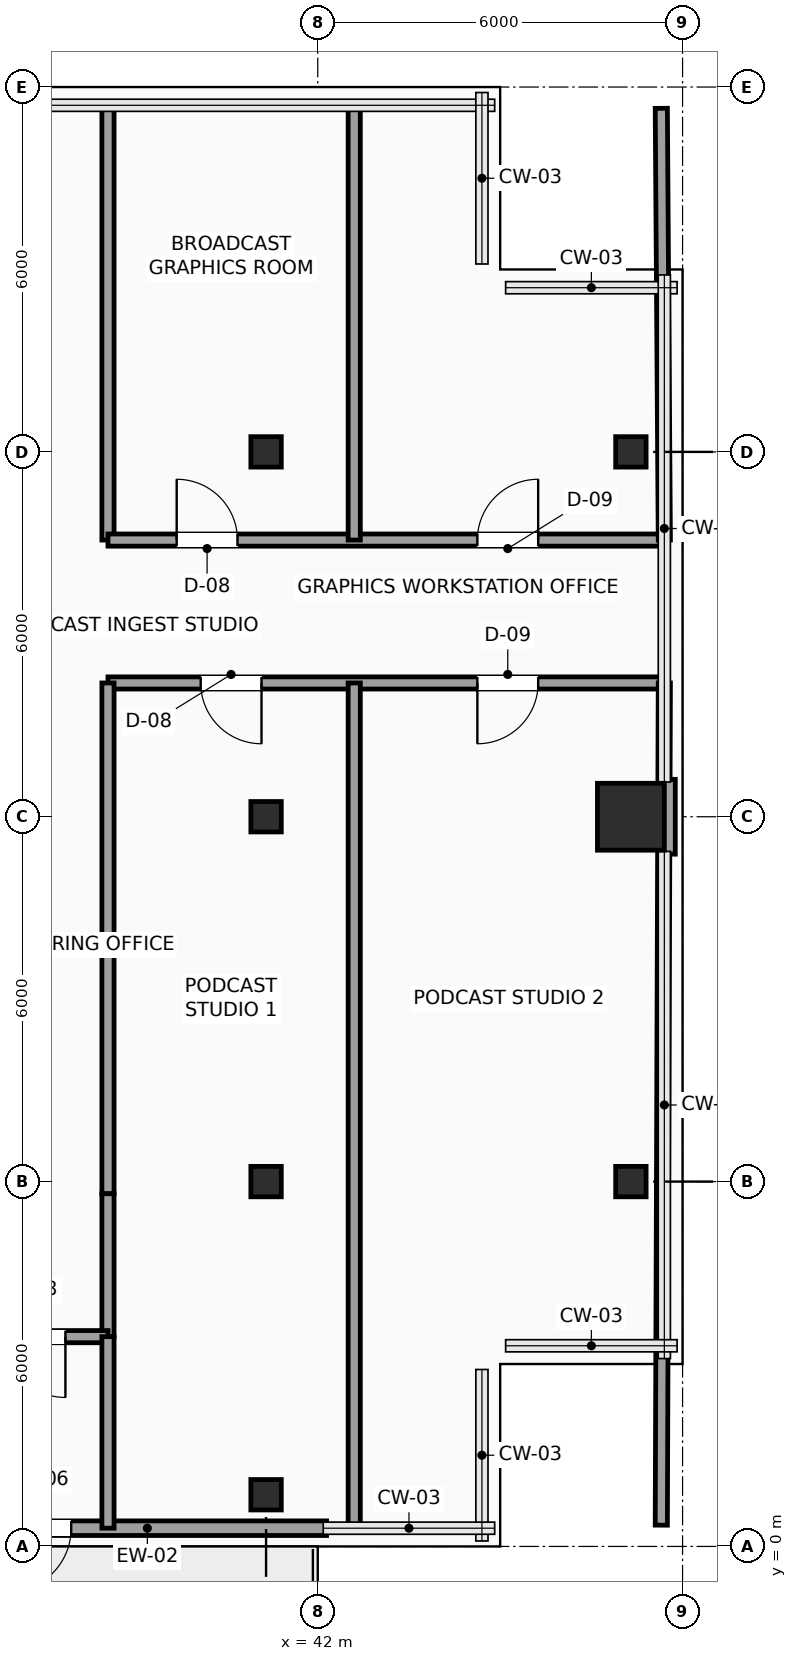
"""IFC4 building model, lengths in metres.
Left out: names, types, materials, properties, quantities, classifications, styles, units other than length and angle.
Written with IfcOpenShell. Run it as: python <this file> out.ifc"""

import sys

from ifc_helpers import new_model, si_unit, direction, frame, frame_2d, origin, origin_2d, place, context, subcontext, project, spatial, rectangle, hollow_rectangle, extrude, element, fill, save


model = new_model("IFC4")
c1 = context("Model", 3, precision=1e-05, world=origin(), true_north=direction((0.0, 1.0)))
c2 = subcontext(c1, "Body", "Model", "MODEL_VIEW")
j1 = project(units=[si_unit("LENGTHUNIT", "METRE"), si_unit("PLANEANGLEUNIT", "RADIAN")], contexts=[c1])
p1 = place(None, origin())
s1 = spatial("IfcSite", under=j1, at=p1, CompositionType="ELEMENT")
p2 = place(p1, origin())
s2 = spatial("IfcBuilding", under=s1, at=p2, CompositionType="ELEMENT")
p3 = place(p2, frame((0.0, 0.0, 119.4)))
s3 = spatial("IfcBuildingStorey", under=s2, at=p3, CompositionType="ELEMENT", Elevation=119.4)
for number, where, z_axis, x_axis in (
    (1, (41.15, 0.85, 0.0), (0.0, 0.0, 1.0), (1.0, 0.0, 0.0)),
    (2, (41.15, 6.0, 0.0), (0.0, 0.0, 1.0), (1.0, 0.0, 0.0)),
    (3, (41.15, 12.0, 0.0), (0.0, 0.0, 1.0), (1.0, 0.0, 0.0)),
    (4, (41.15, 18.0, 0.0), (0.0, 0.0, 1.0), (1.0, 0.0, 0.0)),
    (5, (47.15, 6.0, 0.0), (0.0, 0.0, 1.0), (1.0, 0.0, 0.0)),
):
    element("IfcColumn", number, at=place(p3, frame(where, z_axis=z_axis, x_axis=x_axis)), inside=s3, PredefinedType="COLUMN", context=c2, shape_type="SweptSolid", body=[
        extrude(hollow_rectangle(XDim=0.5, YDim=0.5, WallThickness=0.025, InnerFilletRadius=0.025, OuterFilletRadius=0.04, at=origin_2d()), origin(), (0.0, 0.0, 1.0), 3.75),
    ])
p4 = place(p3, frame((47.15, 12.0, 0.0), z_axis=(0.0, 0.0, 1.0), x_axis=(1.0, 0.0, 0.0)))
e6 = element("IfcColumn", 6, at=p4, inside=s3, PredefinedType="COLUMN", context=c2, shape_type="SweptSolid", body=[
    extrude(rectangle(XDim=1.1, YDim=1.1, at=origin_2d()), origin(), (0.0, 0.0, 1.0), 3.75),
])
p5 = place(p3, frame((47.15, 18.0, 0.0), z_axis=(0.0, 0.0, 1.0), x_axis=(1.0, 0.0, 0.0)))
e7 = element("IfcColumn", 7, at=p5, inside=s3, PredefinedType="COLUMN", context=c2, shape_type="SweptSolid", body=[
    extrude(hollow_rectangle(XDim=0.5, YDim=0.5, WallThickness=0.025, InnerFilletRadius=0.025, OuterFilletRadius=0.04, at=origin_2d()), origin(), (0.0, 0.0, 1.0), 3.75),
])
p6 = place(p3, frame((42.145, 0.3, 0.0), z_axis=(0.0, 0.0, 1.0), x_axis=(-1.0, 0.0, 0.0)))
e8 = element("IfcWall", 8, at=p6, inside=s3, PredefinedType="SOLIDWALL", context=c2, shape_type="SweptSolid", body=[
    extrude(rectangle(XDim=9.29, YDim=0.24, at=frame_2d((4.645, 0.0))), origin(), (0.0, 0.0, 1.0), 3.525),
])
p7 = place(p6, frame((4.2, 0.0, 0.0)))
e9 = element("IfcOpeningElement", 9, at=p7, cuts=e8, PredefinedType="OPENING", context=c2, shape_type="SweptSolid", body=[
    extrude(rectangle(XDim=1.05, YDim=2.2, at=frame_2d((0.525, 1.1))), frame((0.0, 0.13, 0.0), z_axis=(0.0, -1.0, 0.0), x_axis=(1.0, 0.0, 0.0)), (0.0, 0.0, 1.0), 0.26),
])
p8 = place(p3, frame((47.76, 12.615, 0.0), z_axis=(0.0, 0.0, 1.0), x_axis=(0.0, -1.0, 0.0)))
e10 = element("IfcWall", 10, at=p8, inside=s3, PredefinedType="SOLIDWALL", context=c2, shape_type="SweptSolid", body=[
    extrude(rectangle(XDim=1.23, YDim=0.24, at=frame_2d((0.615, 0.0))), origin(), (0.0, 0.0, 1.0), 3.525),
])
p9 = place(p3, frame((38.55, 23.7, 0.0), z_axis=(0.0, 0.0, 1.0), x_axis=(0.0, -1.0, 0.0)))
e11 = element("IfcWall", 11, at=p9, inside=s3, PredefinedType="SOLIDWALL", context=c2, shape_type="SweptSolid", body=[
    extrude(rectangle(XDim=7.15, YDim=0.2, at=frame_2d((3.575, 0.0))), origin(), (0.0, 0.0, 1.0), 3.525),
])
p10 = place(p3, frame((38.55, 16.55, 0.0), z_axis=(0.0, 0.0, 1.0), x_axis=(1.0, 0.0, 0.0)))
e12 = element("IfcWall", 12, at=p10, inside=s3, PredefinedType="SOLIDWALL", context=c2, shape_type="SweptSolid", body=[
    extrude(rectangle(XDim=9.15, YDim=0.2, at=frame_2d((4.575, 0.0))), origin(), (0.0, 0.0, 1.0), 3.525),
])
p11 = place(p10, frame((1.13, 0.0, 0.0)))
e13 = element("IfcOpeningElement", 13, at=p11, cuts=e12, PredefinedType="OPENING", context=c2, shape_type="SweptSolid", body=[
    extrude(rectangle(XDim=1.0, YDim=2.2, at=frame_2d((0.5, 1.1))), frame((0.0, 0.11, 0.0), z_axis=(0.0, -1.0, 0.0), x_axis=(1.0, 0.0, 0.0)), (0.0, 0.0, 1.0), 0.22),
])
p12 = place(p10, frame((6.075, 0.0, 0.0)))
e14 = element("IfcOpeningElement", 14, at=p12, cuts=e12, PredefinedType="OPENING", context=c2, shape_type="SweptSolid", body=[
    extrude(rectangle(XDim=1.0, YDim=2.2, at=frame_2d((0.5, 1.1))), frame((0.0, 0.11, 0.0), z_axis=(0.0, -1.0, 0.0), x_axis=(1.0, 0.0, 0.0)), (0.0, 0.0, 1.0), 0.22),
])
p13 = place(p3, frame((47.7, 14.2, 0.0), z_axis=(0.0, 0.0, 1.0), x_axis=(-1.0, 0.0, 0.0)))
e15 = element("IfcWall", 15, at=p13, inside=s3, PredefinedType="SOLIDWALL", context=c2, shape_type="SweptSolid", body=[
    extrude(rectangle(XDim=9.15, YDim=0.2, at=frame_2d((4.575, 0.0))), origin(), (0.0, 0.0, 1.0), 3.525),
])
p14 = place(p13, frame((6.625, 0.0, 0.0)))
e16 = element("IfcOpeningElement", 16, at=p14, cuts=e15, PredefinedType="OPENING", context=c2, shape_type="SweptSolid", body=[
    extrude(rectangle(XDim=1.0, YDim=2.2, at=frame_2d((0.5, 1.1))), frame((0.0, 0.11, 0.0), z_axis=(0.0, -1.0, 0.0), x_axis=(1.0, 0.0, 0.0)), (0.0, 0.0, 1.0), 0.22),
])
p15 = place(p13, frame((2.075, 0.0, 0.0)))
e17 = element("IfcOpeningElement", 17, at=p15, cuts=e15, PredefinedType="OPENING", context=c2, shape_type="SweptSolid", body=[
    extrude(rectangle(XDim=1.0, YDim=2.2, at=frame_2d((0.5, 1.1))), frame((0.0, 0.11, 0.0), z_axis=(0.0, -1.0, 0.0), x_axis=(1.0, 0.0, 0.0)), (0.0, 0.0, 1.0), 0.22),
])
p16 = place(p3, frame((38.55, 14.2, 0.0), z_axis=(0.0, 0.0, 1.0), x_axis=(0.0, -1.0, 0.0)))
e18 = element("IfcWall", 18, at=p16, inside=s3, PredefinedType="SOLIDWALL", context=c2, shape_type="SweptSolid", body=[
    extrude(rectangle(XDim=8.4, YDim=0.2, at=frame_2d((4.2, 0.0))), origin(), (0.0, 0.0, 1.0), 3.525),
])
p17 = place(p3, frame((38.55, 5.8, 0.0), z_axis=(0.0, 0.0, 1.0), x_axis=(0.0, -1.0, 0.0)))
e19 = element("IfcWall", 19, at=p17, inside=s3, PredefinedType="SOLIDWALL", context=c2, shape_type="SweptSolid", body=[
    extrude(rectangle(XDim=2.35, YDim=0.2, at=frame_2d((1.175, 0.0))), origin(), (0.0, 0.0, 1.0), 3.525),
])
p18 = place(p3, frame((38.55, 3.45, 0.0), z_axis=(0.0, 0.0, 1.0), x_axis=(-1.0, 0.0, 0.0)))
e20 = element("IfcWall", 20, at=p18, inside=s3, PredefinedType="SOLIDWALL", context=c2, shape_type="SweptSolid", body=[
    extrude(rectangle(XDim=2.4, YDim=0.2, at=frame_2d((1.2, 0.0))), origin(), (0.0, 0.0, 1.0), 3.067),
])
p19 = place(p18, frame((0.7, 0.0, 0.0)))
e21 = element("IfcOpeningElement", 21, at=p19, cuts=e20, PredefinedType="OPENING", context=c2, shape_type="SweptSolid", body=[
    extrude(rectangle(XDim=1.0, YDim=2.2, at=frame_2d((0.5, 1.1))), frame((0.0, 0.11, 0.0), z_axis=(0.0, -1.0, 0.0), x_axis=(1.0, 0.0, 0.0)), (0.0, 0.0, 1.0), 0.22),
])
p20 = place(p3, frame((38.55, 0.3, 0.0), z_axis=(0.0, 0.0, 1.0), x_axis=(0.0, 1.0, 0.0)))
e22 = element("IfcWall", 22, at=p20, inside=s3, PredefinedType="PARTITIONING", context=c2, shape_type="SweptSolid", body=[
    extrude(rectangle(XDim=3.15, YDim=0.2, at=frame_2d((1.575, 0.0))), origin(), (0.0, 0.0, 1.0), 3.525),
])
p21 = place(p3, frame((42.6, 0.3, 0.0), z_axis=(0.0, 0.0, 1.0), x_axis=(0.0, 1.0, 0.0)))
e23 = element("IfcWall", 23, at=p21, inside=s3, PredefinedType="PARTITIONING", context=c2, shape_type="SweptSolid", body=[
    extrude(rectangle(XDim=13.9, YDim=0.2, at=frame_2d((6.95, 0.0))), origin(), (0.0, 0.0, 1.0), 3.525),
])
p22 = place(p3, frame((47.65, 0.35, 0.0), z_axis=(0.0, 0.0, 1.0), x_axis=(0.003606251025, 0.999993497456, 0.0)))
e24 = element("IfcWall", 24, at=p22, inside=s3, PredefinedType="PARTITIONING", context=c2, shape_type="SweptSolid", body=[
    extrude(rectangle(XDim=11.035, YDim=0.2, at=frame_2d((5.518, 0.0))), origin(), (0.0, 0.0, 1.0), 3.525),
])
p23 = place(p3, frame((47.694, 12.615, 0.0), z_axis=(0.0, 0.0, 1.0), x_axis=(0.003542799701, 0.999993724265, 0.0)))
e25 = element("IfcWall", 25, at=p23, inside=s3, PredefinedType="PARTITIONING", context=c2, shape_type="SweptSolid", body=[
    extrude(rectangle(XDim=1.585, YDim=0.2, at=frame_2d((0.792, 0.0))), origin(), (0.0, 0.0, 1.0), 3.525),
])
p24 = place(p3, frame((42.6, 16.55, 0.0), z_axis=(0.0, 0.0, 1.0), x_axis=(0.0, 1.0, 0.0)))
e26 = element("IfcWall", 26, at=p24, inside=s3, PredefinedType="PARTITIONING", context=c2, shape_type="SweptSolid", body=[
    extrude(rectangle(XDim=7.15, YDim=0.2, at=frame_2d((3.575, 0.0))), origin(), (0.0, 0.0, 1.0), 3.525),
])
p25 = place(p3, frame((47.7, 16.55, 0.0), z_axis=(0.0, 0.0, 1.0), x_axis=(-0.007049101019, 0.999975154779, 0.0)))
e27 = element("IfcWall", 27, at=p25, inside=s3, PredefinedType="PARTITIONING", context=c2, shape_type="SweptSolid", body=[
    extrude(rectangle(XDim=7.1, YDim=0.2, at=frame_2d((3.55, 0.0))), origin(), (0.0, 0.0, 1.0), 3.525),
])
p26 = place(p7, origin())
e28 = element("IfcDoor", 28, at=p26, inside=s3, OperationType="SINGLE_SWING_RIGHT", PredefinedType="DOOR", context=c2, shape_type="SweptSolid", body=[
    extrude(rectangle(XDim=1.05, YDim=2.2, at=frame_2d((0.525, 1.1))), frame((0.0, 0.025, 0.0), z_axis=(0.0, -1.0, 0.0), x_axis=(1.0, 0.0, 0.0)), (0.0, 0.0, 1.0), 0.05),
])
fill(e9, e28)
p27 = place(p11, origin())
e29 = element("IfcDoor", 29, at=p27, inside=s3, OperationType="SINGLE_SWING_LEFT", PredefinedType="DOOR", context=c2, shape_type="SweptSolid", body=[
    extrude(rectangle(XDim=1.0, YDim=2.2, at=frame_2d((0.5, 1.1))), frame((0.0, 0.025, 0.0), z_axis=(0.0, -1.0, 0.0), x_axis=(1.0, 0.0, 0.0)), (0.0, 0.0, 1.0), 0.05),
])
fill(e13, e29)
p28 = place(p12, origin())
e30 = element("IfcDoor", 30, at=p28, inside=s3, OperationType="SINGLE_SWING_RIGHT", PredefinedType="DOOR", context=c2, shape_type="SweptSolid", body=[
    extrude(rectangle(XDim=1.0, YDim=2.2, at=frame_2d((0.5, 1.1))), frame((0.0, 0.025, 0.0), z_axis=(0.0, -1.0, 0.0), x_axis=(1.0, 0.0, 0.0)), (0.0, 0.0, 1.0), 0.05),
])
fill(e14, e30)
p29 = place(p14, origin())
e31 = element("IfcDoor", 31, at=p29, inside=s3, OperationType="SINGLE_SWING_LEFT", PredefinedType="DOOR", context=c2, shape_type="SweptSolid", body=[
    extrude(rectangle(XDim=1.0, YDim=2.2, at=frame_2d((0.5, 1.1))), frame((0.0, 0.025, 0.0), z_axis=(0.0, -1.0, 0.0), x_axis=(1.0, 0.0, 0.0)), (0.0, 0.0, 1.0), 0.05),
])
fill(e16, e31)
p30 = place(p15, origin())
e32 = element("IfcDoor", 32, at=p30, inside=s3, OperationType="SINGLE_SWING_RIGHT", PredefinedType="DOOR", context=c2, shape_type="SweptSolid", body=[
    extrude(rectangle(XDim=1.0, YDim=2.2, at=frame_2d((0.5, 1.1))), frame((0.0, 0.025, 0.0), z_axis=(0.0, -1.0, 0.0), x_axis=(1.0, 0.0, 0.0)), (0.0, 0.0, 1.0), 0.05),
])
fill(e17, e32)
p31 = place(p19, origin())
e33 = element("IfcDoor", 33, at=p31, inside=s3, OperationType="SINGLE_SWING_LEFT", PredefinedType="DOOR", context=c2, shape_type="SweptSolid", body=[
    extrude(rectangle(XDim=1.0, YDim=2.2, at=frame_2d((0.5, 1.1))), frame((0.0, 0.025, 0.0), z_axis=(0.0, -1.0, 0.0), x_axis=(1.0, 0.0, 0.0)), (0.0, 0.0, 1.0), 0.05),
])
fill(e21, e33)
save(model, sys.argv[1])
